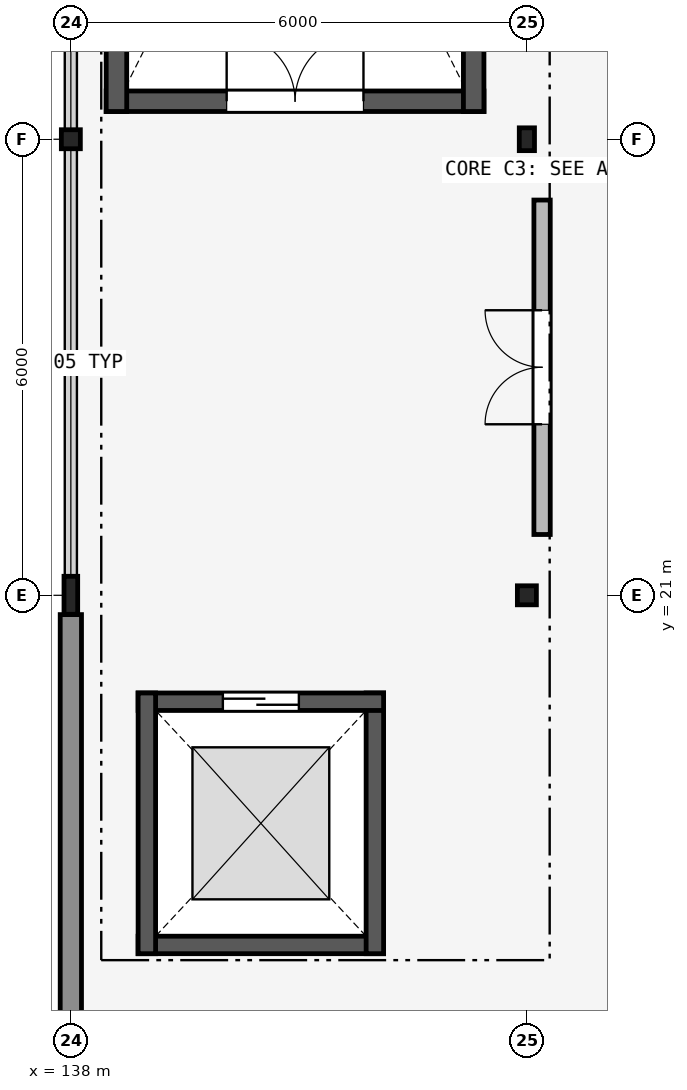
"""IFC4 building model, lengths in metres.
Left out: names, types, materials, properties, quantities, classifications, styles, units other than length and angle.
Written with IfcOpenShell. Run it as: python <this file> out.ifc"""

import sys

from ifc_helpers import new_model, si_unit, direction, frame, frame_2d, origin, origin_2d, place, context, subcontext, project, spatial, rectangle, hollow_rectangle, i_section, extrude, element, fill, save


model = new_model("IFC4")
c1 = context("Model", 3, precision=1e-05, world=origin(), true_north=direction((0.0, 1.0)))
c2 = subcontext(c1, "Body", "Model", "MODEL_VIEW")
j1 = project(units=[si_unit("LENGTHUNIT", "METRE"), si_unit("PLANEANGLEUNIT", "RADIAN")], contexts=[c1])
p1 = place(None, origin())
s1 = spatial("IfcSite", under=j1, at=p1, CompositionType="ELEMENT")
p2 = place(p1, origin())
s2 = spatial("IfcBuilding", under=s1, at=p2, CompositionType="ELEMENT")
p3 = place(p2, frame((0.0, 0.0, 30.0)))
s3 = spatial("IfcBuildingStorey", under=s2, at=p3, CompositionType="ELEMENT", Elevation=30.0)
p4 = place(p3, frame((138.0, 21.0, 0.0), z_axis=(0.0, 0.0, 1.0), x_axis=(1.0, 0.0, 0.0)))
e1 = element("IfcColumn", 1, at=p4, inside=s3, PredefinedType="COLUMN", context=c2, shape_type="SweptSolid", body=[
    extrude(i_section(OverallWidth=0.18, OverallDepth=0.5, WebThickness=0.01, FlangeThickness=0.017, FilletRadius=0.017, at=origin_2d()), origin(), (0.0, 0.0, 1.0), 4.2),
])
for number, where, z_axis, x_axis in (
    (2, (138.0, 27.0, 0.0), (0.0, 0.0, 1.0), (1.0, 0.0, 0.0)),
    (3, (144.0, 21.0, 0.0), (0.0, 0.0, 1.0), (1.0, 0.0, 0.0)),
):
    element("IfcColumn", number, at=place(p3, frame(where, z_axis=z_axis, x_axis=x_axis)), inside=s3, PredefinedType="COLUMN", context=c2, shape_type="SweptSolid", body=[
        extrude(hollow_rectangle(XDim=0.25, YDim=0.25, WallThickness=0.012, InnerFilletRadius=0.012, OuterFilletRadius=0.024, at=origin_2d()), origin(), (0.0, 0.0, 1.0), 4.2),
    ])
p5 = place(p3, frame((144.0, 27.0, 0.0), z_axis=(0.0, 0.0, 1.0), x_axis=(1.0, 0.0, 0.0)))
e4 = element("IfcColumn", 4, at=p5, inside=s3, PredefinedType="COLUMN", context=c2, shape_type="SweptSolid", body=[
    extrude(hollow_rectangle(XDim=0.2, YDim=0.3, WallThickness=0.012, InnerFilletRadius=0.012, OuterFilletRadius=0.024, at=origin_2d()), origin(), (0.0, 0.0, 1.0), 4.2),
])
p6 = place(p3, frame((138.0, 15.154, 0.0), z_axis=(0.0, 0.0, 1.0), x_axis=(0.0, 1.0, 0.0)))
e5 = element("IfcWall", 5, at=p6, inside=s3, PredefinedType="SOLIDWALL", context=c2, shape_type="SweptSolid", body=[
    extrude(rectangle(XDim=5.592, YDim=0.28, at=frame_2d((2.796, 0.0))), origin(), (0.0, 0.0, 1.0), 3.43),
])
p7 = place(p3, frame((138.465, 27.5, 0.0), z_axis=(0.0, 0.0, 1.0), x_axis=(1.0, 0.0, 0.0)))
e6 = element("IfcWall", 6, at=p7, inside=s3, PredefinedType="SHEAR", context=c2, shape_type="SweptSolid", body=[
    extrude(rectangle(XDim=4.97, YDim=0.27, at=frame_2d((2.485, 0.0))), origin(), (0.0, 0.0, 1.0), 4.06),
])
p8 = place(p7, frame((1.585, 0.0, 0.0)))
e7 = element("IfcOpeningElement", 7, at=p8, cuts=e6, PredefinedType="OPENING", context=c2, shape_type="SweptSolid", body=[
    extrude(rectangle(XDim=1.8, YDim=2.2, at=frame_2d((0.9, 1.1))), frame((0.0, 0.145, 0.0), z_axis=(0.0, -1.0, 0.0), x_axis=(1.0, 0.0, 0.0)), (0.0, 0.0, 1.0), 0.29),
])
for number, where, z_axis, x_axis in (
    (8, (143.3, 27.365, 0.0), (0.0, 0.0, 1.0), (0.0, 1.0, 0.0)),
    (9, (138.6, 36.935, 0.0), (0.0, 0.0, 1.0), (0.0, -1.0, 0.0)),
):
    element("IfcWall", number, at=place(p3, frame(where, z_axis=z_axis, x_axis=x_axis)), inside=s3, PredefinedType="SHEAR", context=c2, shape_type="SweptSolid", body=[
        extrude(rectangle(XDim=9.57, YDim=0.27, at=frame_2d((4.785, 0.0))), origin(), (0.0, 0.0, 1.0), 4.06),
    ])
p9 = place(p3, frame((144.2, 21.8, 0.0), z_axis=(0.0, 0.0, 1.0), x_axis=(0.0, 1.0, 0.0)))
e10 = element("IfcWall", 10, at=p9, inside=s3, PredefinedType="PARTITIONING", context=c2, shape_type="SweptSolid", body=[
    extrude(rectangle(XDim=4.4, YDim=0.215, at=frame_2d((2.2, 0.0))), origin(), (0.0, 0.0, 1.0), 3.58),
])
p10 = place(p9, frame((1.45, 0.0, 0.0)))
e11 = element("IfcOpeningElement", 11, at=p10, cuts=e10, PredefinedType="OPENING", context=c2, shape_type="SweptSolid", body=[
    extrude(rectangle(XDim=1.5, YDim=2.15, at=frame_2d((0.75, 1.075))), frame((0.0, 0.117, 0.0), z_axis=(0.0, -1.0, 0.0), x_axis=(1.0, 0.0, 0.0)), (0.0, 0.0, 1.0), 0.235),
])
p11 = place(p3, frame((138.885, 16.4, 0.0), z_axis=(0.0, 0.0, 1.0), x_axis=(1.0, 0.0, 0.0)))
e12 = element("IfcWall", 12, at=p11, inside=s3, PredefinedType="SHEAR", context=c2, shape_type="SweptSolid", body=[
    extrude(rectangle(XDim=3.23, YDim=0.23, at=frame_2d((1.615, 0.0))), origin(), (0.0, 0.0, 1.0), 4.2),
])
p12 = place(p3, frame((142.0, 16.285, 0.0), z_axis=(0.0, 0.0, 1.0), x_axis=(0.0, 1.0, 0.0)))
e13 = element("IfcWall", 13, at=p12, inside=s3, PredefinedType="SHEAR", context=c2, shape_type="SweptSolid", body=[
    extrude(rectangle(XDim=3.43, YDim=0.23, at=frame_2d((1.715, 0.0))), origin(), (0.0, 0.0, 1.0), 4.2),
])
p13 = place(p3, frame((142.115, 19.6, 0.0), z_axis=(0.0, 0.0, 1.0), x_axis=(-1.0, 0.0, 0.0)))
e14 = element("IfcWall", 14, at=p13, inside=s3, PredefinedType="SHEAR", context=c2, shape_type="SweptSolid", body=[
    extrude(rectangle(XDim=3.23, YDim=0.23, at=frame_2d((1.615, 0.0))), origin(), (0.0, 0.0, 1.0), 4.2),
])
p14 = place(p13, frame((1.115, 0.0, 0.0)))
e15 = element("IfcOpeningElement", 15, at=p14, cuts=e14, PredefinedType="OPENING", context=c2, shape_type="SweptSolid", body=[
    extrude(rectangle(XDim=1.0, YDim=2.15, at=frame_2d((0.5, 1.075))), frame((0.0, 0.125, 0.0), z_axis=(0.0, -1.0, 0.0), x_axis=(1.0, 0.0, 0.0)), (0.0, 0.0, 1.0), 0.25),
])
p15 = place(p3, frame((139.0, 19.715, 0.0), z_axis=(0.0, 0.0, 1.0), x_axis=(0.0, -1.0, 0.0)))
e16 = element("IfcWall", 16, at=p15, inside=s3, PredefinedType="SHEAR", context=c2, shape_type="SweptSolid", body=[
    extrude(rectangle(XDim=3.43, YDim=0.23, at=frame_2d((1.715, 0.0))), origin(), (0.0, 0.0, 1.0), 4.2),
])
p16 = place(p8, origin())
e17 = element("IfcDoor", 17, at=p16, inside=s3, OperationType="DOUBLE_DOOR_SINGLE_SWING", PredefinedType="DOOR", context=c2, shape_type="SweptSolid", body=[
    extrude(rectangle(XDim=1.8, YDim=2.2, at=frame_2d((0.9, 1.1))), frame((0.0, 0.025, 0.0), z_axis=(0.0, -1.0, 0.0), x_axis=(1.0, 0.0, 0.0)), (0.0, 0.0, 1.0), 0.05),
])
fill(e7, e17)
p17 = place(p10, origin())
e18 = element("IfcDoor", 18, at=p17, inside=s3, OperationType="DOUBLE_DOOR_SINGLE_SWING", PredefinedType="DOOR", context=c2, shape_type="SweptSolid", body=[
    extrude(rectangle(XDim=1.5, YDim=2.15, at=frame_2d((0.75, 1.075))), frame((0.0, 0.025, 0.0), z_axis=(0.0, -1.0, 0.0), x_axis=(1.0, 0.0, 0.0)), (0.0, 0.0, 1.0), 0.05),
])
fill(e11, e18)
p18 = place(p14, origin())
e19 = element("IfcDoor", 19, at=p18, inside=s3, OperationType="SLIDING_TO_LEFT", PredefinedType="DOOR", context=c2, shape_type="SweptSolid", body=[
    extrude(rectangle(XDim=1.0, YDim=2.15, at=frame_2d((0.5, 1.075))), frame((0.0, 0.025, 0.0), z_axis=(0.0, -1.0, 0.0), x_axis=(1.0, 0.0, 0.0)), (0.0, 0.0, 1.0), 0.05),
])
fill(e15, e19)
save(model, sys.argv[1])
